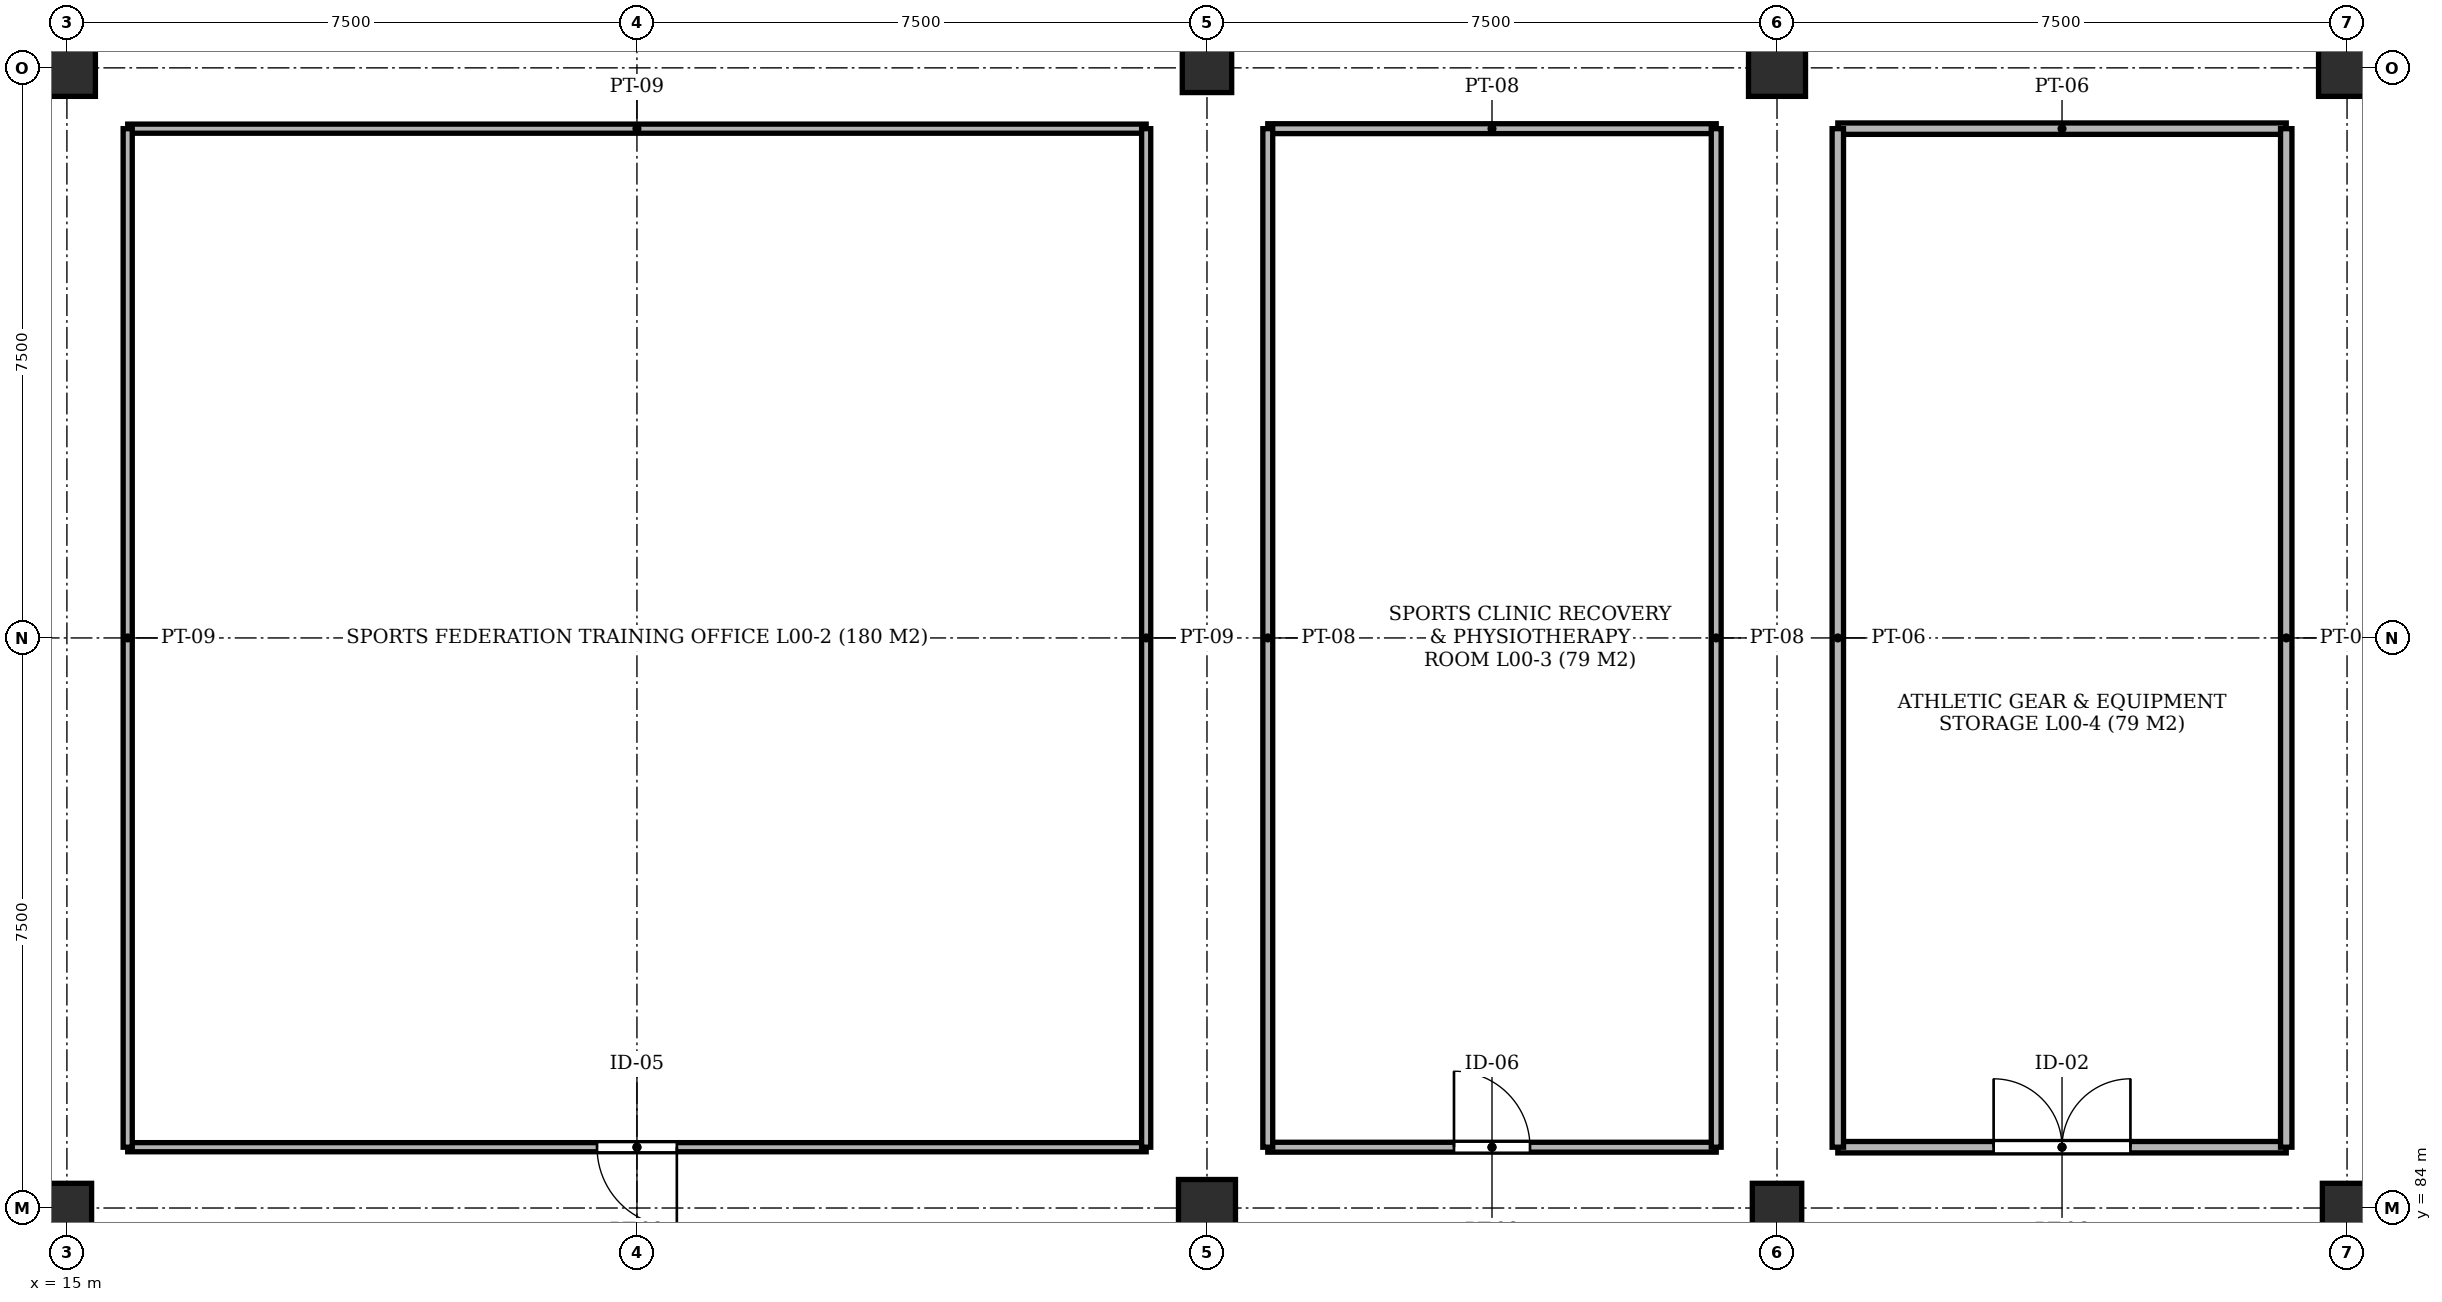
"""IFC4 building model, lengths in metres.
Left out: names, types, materials, properties, quantities, classifications, styles, units other than length and angle.
Written with IfcOpenShell. Run it as: python <this file> out.ifc"""

import sys

from ifc_helpers import new_model, si_unit, direction, frame, frame_2d, origin, origin_2d, place, context, subcontext, project, spatial, rectangle, extrude, element, fill, save


model = new_model("IFC4")
c1 = context("Model", 3, precision=1e-05, world=origin(), true_north=direction((0.0, 1.0)))
c2 = subcontext(c1, "Body", "Model", "MODEL_VIEW")
j1 = project(units=[si_unit("LENGTHUNIT", "METRE"), si_unit("PLANEANGLEUNIT", "RADIAN")], contexts=[c1])
p1 = place(None, origin())
s1 = spatial("IfcSite", under=j1, at=p1, CompositionType="ELEMENT")
p2 = place(p1, origin())
s2 = spatial("IfcBuilding", under=s1, at=p2, CompositionType="ELEMENT")
p3 = place(p2, origin())
s3 = spatial("IfcBuildingStorey", under=s2, at=p3, CompositionType="ELEMENT", Elevation=0.0)
p4 = place(p3, frame((15.0, 84.0, -0.35), z_axis=(0.0, 0.0, 1.0), x_axis=(1.0, 0.0, 0.0)))
e1 = element("IfcColumn", 1, at=p4, inside=s3, PredefinedType="COLUMN", context=c2, shape_type="SweptSolid", body=[
    extrude(rectangle(XDim=0.65, YDim=0.65, at=origin_2d()), origin(), (0.0, 0.0, 1.0), 4.65),
])
for number, where, z_axis, x_axis in (
    (2, (15.0, 99.0, -0.35), (0.0, 0.0, 1.0), (1.0, 0.0, 0.0)),
    (3, (30.0, 84.0, -0.35), (0.0, 0.0, 1.0), (1.0, 0.0, 0.0)),
):
    element("IfcColumn", number, at=place(p3, frame(where, z_axis=z_axis, x_axis=x_axis)), inside=s3, PredefinedType="COLUMN", context=c2, shape_type="SweptSolid", body=[
        extrude(rectangle(XDim=0.75, YDim=0.75, at=origin_2d()), origin(), (0.0, 0.0, 1.0), 4.65),
    ])
for number, where, z_axis, x_axis in (
    (4, (30.0, 99.0, -0.35), (0.0, 0.0, 1.0), (1.0, 0.0, 0.0)),
    (5, (37.5, 84.0, -0.35), (0.0, 0.0, 1.0), (1.0, 0.0, 0.0)),
):
    element("IfcColumn", number, at=place(p3, frame(where, z_axis=z_axis, x_axis=x_axis)), inside=s3, PredefinedType="COLUMN", context=c2, shape_type="SweptSolid", body=[
        extrude(rectangle(XDim=0.65, YDim=0.65, at=origin_2d()), origin(), (0.0, 0.0, 1.0), 4.65),
    ])
p5 = place(p3, frame((37.5, 99.0, -0.35), z_axis=(0.0, 0.0, 1.0), x_axis=(1.0, 0.0, 0.0)))
e6 = element("IfcColumn", 6, at=p5, inside=s3, PredefinedType="COLUMN", context=c2, shape_type="SweptSolid", body=[
    extrude(rectangle(XDim=0.75, YDim=0.75, at=origin_2d()), origin(), (0.0, 0.0, 1.0), 4.65),
])
p6 = place(p3, frame((45.0, 84.0, -0.35), z_axis=(0.0, 0.0, 1.0), x_axis=(1.0, 0.0, 0.0)))
e7 = element("IfcColumn", 7, at=p6, inside=s3, PredefinedType="COLUMN", context=c2, shape_type="SweptSolid", body=[
    extrude(rectangle(XDim=0.65, YDim=0.65, at=origin_2d()), origin(), (0.0, 0.0, 1.0), 4.65),
])
p7 = place(p3, frame((45.0, 99.0, -0.35), z_axis=(0.0, 0.0, 1.0), x_axis=(1.0, 0.0, 0.0)))
e8 = element("IfcColumn", 8, at=p7, inside=s3, PredefinedType="COLUMN", context=c2, shape_type="SweptSolid", body=[
    extrude(rectangle(XDim=0.75, YDim=0.75, at=origin_2d()), origin(), (0.0, 0.0, 1.0), 4.65),
])
p8 = place(p3, frame((15.8, 84.8, 0.0), z_axis=(0.0, 0.0, 1.0), x_axis=(1.0, 0.0, 0.0)))
e9 = element("IfcWall", 9, at=p8, inside=s3, PredefinedType="PARTITIONING", context=c2, shape_type="SweptSolid", body=[
    extrude(rectangle(XDim=13.4, YDim=0.12, at=frame_2d((6.7, 0.0))), origin(), (0.0, 0.0, 1.0), 3.88),
])
p9 = place(p8, frame((6.175, 0.0, 0.0)))
e10 = element("IfcOpeningElement", 10, at=p9, cuts=e9, PredefinedType="OPENING", context=c2, shape_type="SweptSolid", body=[
    extrude(rectangle(XDim=1.05, YDim=2.15, at=frame_2d((0.525, 1.075))), frame((0.0, 0.072, 0.0), z_axis=(0.0, -1.0, 0.0), x_axis=(1.0, 0.0, 0.0)), (0.0, 0.0, 1.0), 0.144),
])
for number, where, z_axis, x_axis in (
    (11, (15.8, 98.2, 0.0), (0.0, 0.0, 1.0), (1.0, 0.0, 0.0)),
    (12, (15.8, 84.8, 0.0), (0.0, 0.0, 1.0), (0.0, 1.0, 0.0)),
    (13, (29.2, 84.8, 0.0), (0.0, 0.0, 1.0), (0.0, 1.0, 0.0)),
):
    element("IfcWall", number, at=place(p3, frame(where, z_axis=z_axis, x_axis=x_axis)), inside=s3, PredefinedType="PARTITIONING", context=c2, shape_type="SweptSolid", body=[
        extrude(rectangle(XDim=13.4, YDim=0.12, at=frame_2d((6.7, 0.0))), origin(), (0.0, 0.0, 1.0), 3.88),
    ])
p10 = place(p3, frame((30.8, 84.8, 0.0), z_axis=(0.0, 0.0, 1.0), x_axis=(1.0, 0.0, 0.0)))
e14 = element("IfcWall", 14, at=p10, inside=s3, PredefinedType="PARTITIONING", context=c2, shape_type="SweptSolid", body=[
    extrude(rectangle(XDim=5.9, YDim=0.13, at=frame_2d((2.95, 0.0))), origin(), (0.0, 0.0, 1.0), 3.88),
])
p11 = place(p10, frame((2.45, 0.0, 0.0)))
e15 = element("IfcOpeningElement", 15, at=p11, cuts=e14, PredefinedType="OPENING", context=c2, shape_type="SweptSolid", body=[
    extrude(rectangle(XDim=1.0, YDim=2.15, at=frame_2d((0.5, 1.075))), frame((0.0, 0.077, 0.0), z_axis=(0.0, -1.0, 0.0), x_axis=(1.0, 0.0, 0.0)), (0.0, 0.0, 1.0), 0.154),
])
p12 = place(p3, frame((30.8, 98.2, 0.0), z_axis=(0.0, 0.0, 1.0), x_axis=(1.0, 0.0, 0.0)))
e16 = element("IfcWall", 16, at=p12, inside=s3, PredefinedType="PARTITIONING", context=c2, shape_type="SweptSolid", body=[
    extrude(rectangle(XDim=5.9, YDim=0.13, at=frame_2d((2.95, 0.0))), origin(), (0.0, 0.0, 1.0), 3.88),
])
for number, where, z_axis, x_axis in (
    (17, (30.8, 84.8, 0.0), (0.0, 0.0, 1.0), (0.0, 1.0, 0.0)),
    (18, (36.7, 84.8, 0.0), (0.0, 0.0, 1.0), (0.0, 1.0, 0.0)),
):
    element("IfcWall", number, at=place(p3, frame(where, z_axis=z_axis, x_axis=x_axis)), inside=s3, PredefinedType="PARTITIONING", context=c2, shape_type="SweptSolid", body=[
        extrude(rectangle(XDim=13.4, YDim=0.13, at=frame_2d((6.7, 0.0))), origin(), (0.0, 0.0, 1.0), 3.88),
    ])
p13 = place(p3, frame((38.3, 84.8, 0.0), z_axis=(0.0, 0.0, 1.0), x_axis=(1.0, 0.0, 0.0)))
e19 = element("IfcWall", 19, at=p13, inside=s3, PredefinedType="PARTITIONING", context=c2, shape_type="SweptSolid", body=[
    extrude(rectangle(XDim=5.9, YDim=0.15, at=frame_2d((2.95, 0.0))), origin(), (0.0, 0.0, 1.0), 3.88),
])
p14 = place(p13, frame((2.05, 0.0, 0.0)))
e20 = element("IfcOpeningElement", 20, at=p14, cuts=e19, PredefinedType="OPENING", context=c2, shape_type="SweptSolid", body=[
    extrude(rectangle(XDim=1.8, YDim=2.25, at=frame_2d((0.9, 1.125))), frame((0.0, 0.087, 0.0), z_axis=(0.0, -1.0, 0.0), x_axis=(1.0, 0.0, 0.0)), (0.0, 0.0, 1.0), 0.174),
])
p15 = place(p3, frame((38.3, 98.2, 0.0), z_axis=(0.0, 0.0, 1.0), x_axis=(1.0, 0.0, 0.0)))
e21 = element("IfcWall", 21, at=p15, inside=s3, PredefinedType="PARTITIONING", context=c2, shape_type="SweptSolid", body=[
    extrude(rectangle(XDim=5.9, YDim=0.15, at=frame_2d((2.95, 0.0))), origin(), (0.0, 0.0, 1.0), 3.88),
])
for number, where, z_axis, x_axis in (
    (22, (38.3, 84.8, 0.0), (0.0, 0.0, 1.0), (0.0, 1.0, 0.0)),
    (23, (44.2, 84.8, 0.0), (0.0, 0.0, 1.0), (0.0, 1.0, 0.0)),
):
    element("IfcWall", number, at=place(p3, frame(where, z_axis=z_axis, x_axis=x_axis)), inside=s3, PredefinedType="PARTITIONING", context=c2, shape_type="SweptSolid", body=[
        extrude(rectangle(XDim=13.4, YDim=0.15, at=frame_2d((6.7, 0.0))), origin(), (0.0, 0.0, 1.0), 3.88),
    ])
p16 = place(p9, frame((1.05, 0.0, 0.0), z_axis=(0.0, 0.0, 1.0), x_axis=(-1.0, 0.0, 0.0)))
e24 = element("IfcDoor", 24, at=p16, inside=s3, OperationType="SINGLE_SWING_RIGHT", PredefinedType="DOOR", context=c2, shape_type="SweptSolid", body=[
    extrude(rectangle(XDim=1.05, YDim=2.15, at=frame_2d((0.525, 1.075))), frame((0.0, 0.025, 0.0), z_axis=(0.0, -1.0, 0.0), x_axis=(1.0, 0.0, 0.0)), (0.0, 0.0, 1.0), 0.05),
])
fill(e10, e24)
p17 = place(p11, origin())
e25 = element("IfcDoor", 25, at=p17, inside=s3, OperationType="SINGLE_SWING_LEFT", PredefinedType="DOOR", context=c2, shape_type="SweptSolid", body=[
    extrude(rectangle(XDim=1.0, YDim=2.15, at=frame_2d((0.5, 1.075))), frame((0.0, 0.025, 0.0), z_axis=(0.0, -1.0, 0.0), x_axis=(1.0, 0.0, 0.0)), (0.0, 0.0, 1.0), 0.05),
])
fill(e15, e25)
p18 = place(p14, origin())
e26 = element("IfcDoor", 26, at=p18, inside=s3, OperationType="DOUBLE_DOOR_SINGLE_SWING", PredefinedType="DOOR", context=c2, shape_type="SweptSolid", body=[
    extrude(rectangle(XDim=1.8, YDim=2.25, at=frame_2d((0.9, 1.125))), frame((0.0, 0.025, 0.0), z_axis=(0.0, -1.0, 0.0), x_axis=(1.0, 0.0, 0.0)), (0.0, 0.0, 1.0), 0.05),
])
fill(e20, e26)
save(model, sys.argv[1])
